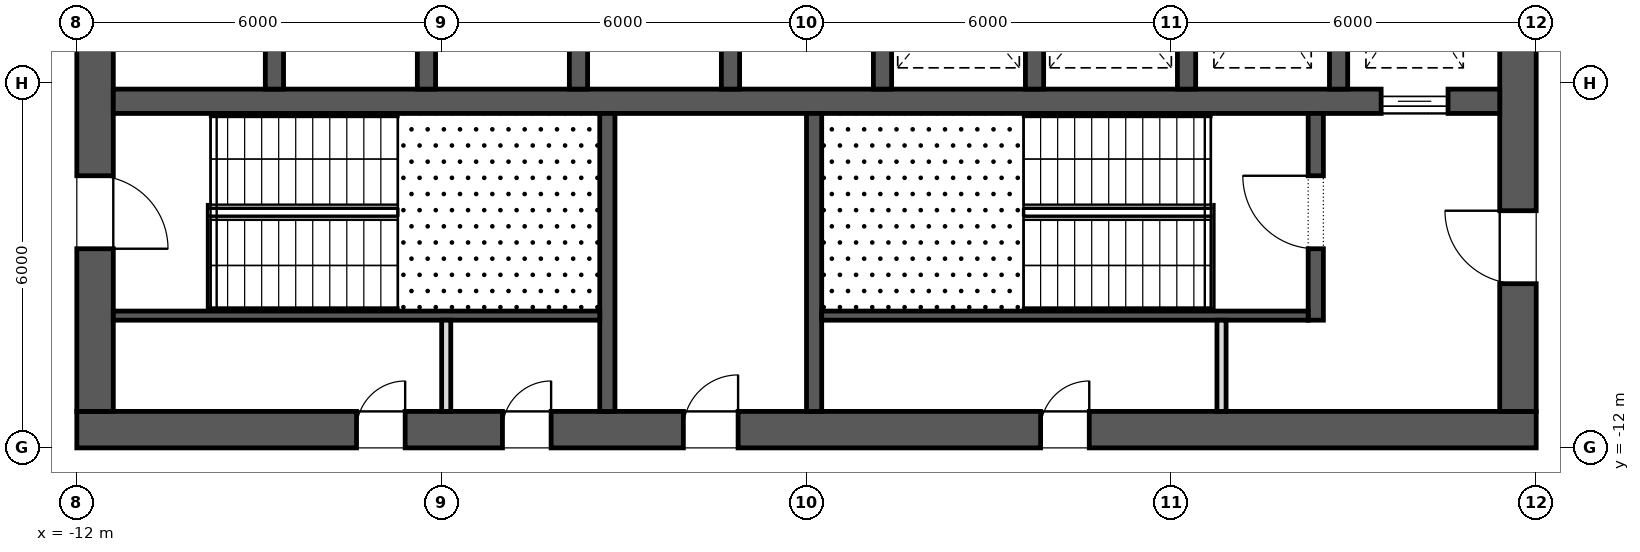
"""IFC4 building model, lengths in metres.
Left out: names, types, materials, properties, quantities, classifications, styles, units other than length and angle.
Written with IfcOpenShell. Run it as: python <this file> out.ifc"""

import sys

from ifc_helpers import new_model, si_unit, direction, frame, frame_2d, origin, place, context, subcontext, project, spatial, rectangle, extrude, element, fill, save


model = new_model("IFC4")
c1 = context("Model", 3, precision=1e-05, world=origin(), true_north=direction((0.0, 1.0)))
c2 = subcontext(c1, "Body", "Model", "MODEL_VIEW")
j1 = project(units=[si_unit("LENGTHUNIT", "METRE"), si_unit("PLANEANGLEUNIT", "RADIAN")], contexts=[c1])
p1 = place(None, origin())
s1 = spatial("IfcSite", under=j1, at=p1, CompositionType="ELEMENT")
p2 = place(p1, origin())
s2 = spatial("IfcBuilding", under=s1, at=p2, CompositionType="ELEMENT")
p3 = place(p2, frame((0.0, 0.0, 27.7)))
s3 = spatial("IfcBuildingStorey", under=s2, at=p3, CompositionType="ELEMENT", Elevation=27.7)
p4 = place(p3, frame((-12.0, -11.7, 0.0), z_axis=(0.0, 0.0, 1.0), x_axis=(1.0, 0.0, 0.0)))
e1 = element("IfcWall", 1, at=p4, inside=s3, PredefinedType="SHEAR", context=c2, shape_type="SweptSolid", body=[
    extrude(rectangle(XDim=24.0, YDim=0.6, at=frame_2d((12.0, 0.0))), origin(), (0.0, 0.0, 1.0), 4.2),
])
p5 = place(p4, frame((9.975, 0.0, 0.0)))
e2 = element("IfcOpeningElement", 2, at=p5, cuts=e1, PredefinedType="OPENING", context=c2, shape_type="SweptSolid", body=[
    extrude(rectangle(XDim=0.9, YDim=2.1, at=frame_2d((0.45, 1.05))), frame((0.0, 0.312, 0.0), z_axis=(0.0, -1.0, 0.0), x_axis=(1.0, 0.0, 0.0)), (0.0, 0.0, 1.0), 0.624),
])
p6 = place(p4, frame((4.6, 0.0, 0.0)))
e3 = element("IfcOpeningElement", 3, at=p6, cuts=e1, PredefinedType="OPENING", context=c2, shape_type="SweptSolid", body=[
    extrude(rectangle(XDim=0.8, YDim=2.1, at=frame_2d((0.4, 1.05))), frame((0.0, 0.312, 0.0), z_axis=(0.0, -1.0, 0.0), x_axis=(1.0, 0.0, 0.0)), (0.0, 0.0, 1.0), 0.624),
])
p7 = place(p4, frame((7.0, 0.0, 0.0)))
e4 = element("IfcOpeningElement", 4, at=p7, cuts=e1, PredefinedType="OPENING", context=c2, shape_type="SweptSolid", body=[
    extrude(rectangle(XDim=0.8, YDim=2.1, at=frame_2d((0.4, 1.05))), frame((0.0, 0.312, 0.0), z_axis=(0.0, -1.0, 0.0), x_axis=(1.0, 0.0, 0.0)), (0.0, 0.0, 1.0), 0.624),
])
p8 = place(p4, frame((15.85, 0.0, 0.0)))
e5 = element("IfcOpeningElement", 5, at=p8, cuts=e1, PredefinedType="OPENING", context=c2, shape_type="SweptSolid", body=[
    extrude(rectangle(XDim=0.8, YDim=2.1, at=frame_2d((0.4, 1.05))), frame((0.0, 0.312, 0.0), z_axis=(0.0, -1.0, 0.0), x_axis=(1.0, 0.0, 0.0)), (0.0, 0.0, 1.0), 0.624),
])
p9 = place(p3, frame((11.7, -11.4, 0.0), z_axis=(0.0, 0.0, 1.0), x_axis=(0.0, 1.0, 0.0)))
e6 = element("IfcWall", 6, at=p9, inside=s3, PredefinedType="SHEAR", context=c2, shape_type="SweptSolid", body=[
    extrude(rectangle(XDim=22.8, YDim=0.6, at=frame_2d((11.4, 0.0))), origin(), (0.0, 0.0, 1.0), 4.2),
])
p10 = place(p9, frame((10.2, 0.0, 0.0)))
e7 = element("IfcOpeningElement", 7, at=p10, cuts=e6, PredefinedType="OPENING", context=c2, shape_type="SweptSolid", body=[
    extrude(rectangle(XDim=2.4, YDim=2.1, at=frame_2d((1.2, 1.05))), frame((0.0, 0.312, 0.0), z_axis=(0.0, -1.0, 0.0), x_axis=(1.0, 0.0, 0.0)), (0.0, 0.0, 1.0), 0.624),
])
p11 = place(p9, frame((19.5, 0.0, 0.0)))
e8 = element("IfcOpeningElement", 8, at=p11, cuts=e6, PredefinedType="OPENING", context=c2, shape_type="SweptSolid", body=[
    extrude(rectangle(XDim=1.2, YDim=2.1, at=frame_2d((0.6, 1.05))), frame((0.0, 0.312, 0.0), z_axis=(0.0, -1.0, 0.0), x_axis=(1.0, 0.0, 0.0)), (0.0, 0.0, 1.0), 0.624),
])
p12 = place(p9, frame((2.1, 0.0, 0.0)))
e9 = element("IfcOpeningElement", 9, at=p12, cuts=e6, PredefinedType="OPENING", context=c2, shape_type="SweptSolid", body=[
    extrude(rectangle(XDim=1.2, YDim=2.1, at=frame_2d((0.6, 1.05))), frame((0.0, 0.312, 0.0), z_axis=(0.0, -1.0, 0.0), x_axis=(1.0, 0.0, 0.0)), (0.0, 0.0, 1.0), 0.624),
])
p13 = place(p3, frame((-11.7, -11.4, 0.0), z_axis=(0.0, 0.0, 1.0), x_axis=(0.0, 1.0, 0.0)))
e10 = element("IfcWall", 10, at=p13, inside=s3, PredefinedType="SHEAR", context=c2, shape_type="SweptSolid", body=[
    extrude(rectangle(XDim=22.8, YDim=0.6, at=frame_2d((11.4, 0.0))), origin(), (0.0, 0.0, 1.0), 4.2),
])
p14 = place(p13, frame((10.2, 0.0, 0.0)))
e11 = element("IfcOpeningElement", 11, at=p14, cuts=e10, PredefinedType="OPENING", context=c2, shape_type="SweptSolid", body=[
    extrude(rectangle(XDim=2.4, YDim=2.1, at=frame_2d((1.2, 1.05))), frame((0.0, 0.312, 0.0), z_axis=(0.0, -1.0, 0.0), x_axis=(1.0, 0.0, 0.0)), (0.0, 0.0, 1.0), 0.624),
])
p15 = place(p13, frame((18.925, 0.0, 0.0)))
e12 = element("IfcOpeningElement", 12, at=p15, cuts=e10, PredefinedType="OPENING", context=c2, shape_type="SweptSolid", body=[
    extrude(rectangle(XDim=1.2, YDim=2.1, at=frame_2d((0.6, 1.05))), frame((0.0, 0.312, 0.0), z_axis=(0.0, -1.0, 0.0), x_axis=(1.0, 0.0, 0.0)), (0.0, 0.0, 1.0), 0.624),
])
p16 = place(p13, frame((2.675, 0.0, 0.0)))
e13 = element("IfcOpeningElement", 13, at=p16, cuts=e10, PredefinedType="OPENING", context=c2, shape_type="SweptSolid", body=[
    extrude(rectangle(XDim=1.2, YDim=2.1, at=frame_2d((0.6, 1.05))), frame((0.0, 0.312, 0.0), z_axis=(0.0, -1.0, 0.0), x_axis=(1.0, 0.0, 0.0)), (0.0, 0.0, 1.0), 0.624),
])
p17 = place(p3, frame((-11.4, -6.3, 0.0), z_axis=(0.0, 0.0, 1.0), x_axis=(1.0, 0.0, 0.0)))
e14 = element("IfcWall", 14, at=p17, inside=s3, PredefinedType="SHEAR", context=c2, shape_type="SweptSolid", body=[
    extrude(rectangle(XDim=22.8, YDim=0.4, at=frame_2d((11.4, 0.0))), origin(), (0.0, 0.0, 1.0), 4.2),
])
p18 = place(p17, frame((20.85, 0.0, 0.0)))
e15 = element("IfcOpeningElement", 15, at=p18, cuts=e14, PredefinedType="OPENING", context=c2, shape_type="SweptSolid", body=[
    extrude(rectangle(XDim=1.1, YDim=2.1, at=frame_2d((0.55, 1.05))), frame((0.0, 0.212, 0.0), z_axis=(0.0, -1.0, 0.0), x_axis=(1.0, 0.0, 0.0)), (0.0, 0.0, 1.0), 0.424),
])
for number, where, z_axis, x_axis in (
    (16, (-8.75, -6.1, 0.0), (0.0, 0.0, 1.0), (0.0, 1.0, 0.0)),
    (17, (-6.25, -6.1, 0.0), (0.0, 0.0, 1.0), (0.0, 1.0, 0.0)),
    (18, (-3.75, -6.1, 0.0), (0.0, 0.0, 1.0), (0.0, 1.0, 0.0)),
    (19, (-1.25, -6.1, 0.0), (0.0, 0.0, 1.0), (0.0, 1.0, 0.0)),
    (20, (1.25, -6.1, 0.0), (0.0, 0.0, 1.0), (0.0, 1.0, 0.0)),
    (21, (3.75, -6.1, 0.0), (0.0, 0.0, 1.0), (0.0, 1.0, 0.0)),
    (22, (6.25, -6.1, 0.0), (0.0, 0.0, 1.0), (0.0, 1.0, 0.0)),
    (23, (8.75, -6.1, 0.0), (0.0, 0.0, 1.0), (0.0, 1.0, 0.0)),
):
    element("IfcWall", number, at=place(p3, frame(where, z_axis=z_axis, x_axis=x_axis)), inside=s3, PredefinedType="SHEAR", context=c2, shape_type="SweptSolid", body=[
        extrude(rectangle(XDim=2.9, YDim=0.3, at=frame_2d((1.45, 0.0))), origin(), (0.0, 0.0, 1.0), 4.2),
    ])
for number, where, z_axis, x_axis in (
    (24, (-3.275, -11.4, 0.0), (0.0, 0.0, 1.0), (0.0, 1.0, 0.0)),
    (25, (0.125, -11.4, 0.0), (0.0, 0.0, 1.0), (0.0, 1.0, 0.0)),
):
    element("IfcWall", number, at=place(p3, frame(where, z_axis=z_axis, x_axis=x_axis)), inside=s3, PredefinedType="SHEAR", context=c2, shape_type="SweptSolid", body=[
        extrude(rectangle(XDim=4.9, YDim=0.25, at=frame_2d((2.45, 0.0))), origin(), (0.0, 0.0, 1.0), 3.9),
    ])
p19 = place(p3, frame((8.375, -9.9, 0.0), z_axis=(0.0, 0.0, 1.0), x_axis=(0.0, 1.0, 0.0)))
e26 = element("IfcWall", 26, at=p19, inside=s3, PredefinedType="SHEAR", context=c2, shape_type="SweptSolid", body=[
    extrude(rectangle(XDim=3.4, YDim=0.25, at=frame_2d((1.7, 0.0))), origin(), (0.0, 0.0, 1.0), 3.9),
])
p20 = place(p19, frame((1.175, 0.0, 0.0)))
e27 = element("IfcOpeningElement", 27, at=p20, cuts=e26, PredefinedType="OPENING", context=c2, shape_type="SweptSolid", body=[
    extrude(rectangle(XDim=1.2, YDim=2.1, at=frame_2d((0.6, 1.05))), frame((0.0, 0.137, 0.0), z_axis=(0.0, -1.0, 0.0), x_axis=(1.0, 0.0, 0.0)), (0.0, 0.0, 1.0), 0.274),
])
for number, where, z_axis, x_axis in (
    (28, (-11.4, -9.825, 0.0), (0.0, 0.0, 1.0), (1.0, 0.0, 0.0)),
    (29, (0.25, -9.825, 0.0), (0.0, 0.0, 1.0), (1.0, 0.0, 0.0)),
):
    element("IfcWall", number, at=place(p3, frame(where, z_axis=z_axis, x_axis=x_axis)), inside=s3, PredefinedType="SHEAR", context=c2, shape_type="SweptSolid", body=[
        extrude(rectangle(XDim=8.0, YDim=0.15, at=frame_2d((4.0, 0.0))), origin(), (0.0, 0.0, 1.0), 3.9),
    ])
for number, where, z_axis, x_axis in (
    (30, (-5.925, -11.4, 0.0), (0.0, 0.0, 1.0), (0.0, 1.0, 0.0)),
    (31, (6.825, -11.4, 0.0), (0.0, 0.0, 1.0), (0.0, 1.0, 0.0)),
):
    element("IfcWall", number, at=place(p3, frame(where, z_axis=z_axis, x_axis=x_axis)), inside=s3, PredefinedType="PARTITIONING", context=c2, shape_type="SweptSolid", body=[
        extrude(rectangle(XDim=1.5, YDim=0.15, at=frame_2d((0.75, 0.0))), origin(), (0.0, 0.0, 1.0), 3.9),
    ])
p21 = place(p18, origin())
e32 = element("IfcDoor", 32, at=p21, inside=s3, OperationType="SLIDING_TO_LEFT", PredefinedType="DOOR", context=c2, shape_type="SweptSolid", body=[
    extrude(rectangle(XDim=1.1, YDim=2.1, at=frame_2d((0.55, 1.05))), frame((0.0, 0.025, 0.0), z_axis=(0.0, -1.0, 0.0), x_axis=(1.0, 0.0, 0.0)), (0.0, 0.0, 1.0), 0.05),
])
fill(e15, e32)
p22 = place(p16, frame((1.2, 0.0, 0.0), z_axis=(0.0, 0.0, 1.0), x_axis=(-1.0, 0.0, 0.0)))
e33 = element("IfcDoor", 33, at=p22, inside=s3, OperationType="SINGLE_SWING_LEFT", PredefinedType="DOOR", context=c2, shape_type="SweptSolid", body=[
    extrude(rectangle(XDim=1.2, YDim=2.1, at=frame_2d((0.6, 1.05))), frame((0.0, 0.025, 0.0), z_axis=(0.0, -1.0, 0.0), x_axis=(1.0, 0.0, 0.0)), (0.0, 0.0, 1.0), 0.05),
])
fill(e13, e33)
p23 = place(p20, origin())
e34 = element("IfcDoor", 34, at=p23, inside=s3, OperationType="SINGLE_SWING_LEFT", PredefinedType="DOOR", context=c2, shape_type="SweptSolid", body=[
    extrude(rectangle(XDim=1.2, YDim=2.1, at=frame_2d((0.6, 1.05))), frame((0.0, 0.025, 0.0), z_axis=(0.0, -1.0, 0.0), x_axis=(1.0, 0.0, 0.0)), (0.0, 0.0, 1.0), 0.05),
])
fill(e27, e34)
p24 = place(p12, origin())
e35 = element("IfcDoor", 35, at=p24, inside=s3, OperationType="SINGLE_SWING_LEFT", PredefinedType="DOOR", context=c2, shape_type="SweptSolid", body=[
    extrude(rectangle(XDim=1.2, YDim=2.1, at=frame_2d((0.6, 1.05))), frame((0.0, 0.025, 0.0), z_axis=(0.0, -1.0, 0.0), x_axis=(1.0, 0.0, 0.0)), (0.0, 0.0, 1.0), 0.05),
])
fill(e9, e35)
p25 = place(p5, origin())
e36 = element("IfcDoor", 36, at=p25, inside=s3, OperationType="SINGLE_SWING_LEFT", PredefinedType="DOOR", context=c2, shape_type="SweptSolid", body=[
    extrude(rectangle(XDim=0.9, YDim=2.1, at=frame_2d((0.45, 1.05))), frame((0.0, 0.025, 0.0), z_axis=(0.0, -1.0, 0.0), x_axis=(1.0, 0.0, 0.0)), (0.0, 0.0, 1.0), 0.05),
])
fill(e2, e36)
p26 = place(p6, origin())
e37 = element("IfcDoor", 37, at=p26, inside=s3, OperationType="SINGLE_SWING_LEFT", PredefinedType="DOOR", context=c2, shape_type="SweptSolid", body=[
    extrude(rectangle(XDim=0.8, YDim=2.1, at=frame_2d((0.4, 1.05))), frame((0.0, 0.025, 0.0), z_axis=(0.0, -1.0, 0.0), x_axis=(1.0, 0.0, 0.0)), (0.0, 0.0, 1.0), 0.05),
])
fill(e3, e37)
p27 = place(p7, origin())
e38 = element("IfcDoor", 38, at=p27, inside=s3, OperationType="SINGLE_SWING_LEFT", PredefinedType="DOOR", context=c2, shape_type="SweptSolid", body=[
    extrude(rectangle(XDim=0.8, YDim=2.1, at=frame_2d((0.4, 1.05))), frame((0.0, 0.025, 0.0), z_axis=(0.0, -1.0, 0.0), x_axis=(1.0, 0.0, 0.0)), (0.0, 0.0, 1.0), 0.05),
])
fill(e4, e38)
p28 = place(p8, origin())
e39 = element("IfcDoor", 39, at=p28, inside=s3, OperationType="SINGLE_SWING_LEFT", PredefinedType="DOOR", context=c2, shape_type="SweptSolid", body=[
    extrude(rectangle(XDim=0.8, YDim=2.1, at=frame_2d((0.4, 1.05))), frame((0.0, 0.025, 0.0), z_axis=(0.0, -1.0, 0.0), x_axis=(1.0, 0.0, 0.0)), (0.0, 0.0, 1.0), 0.05),
])
fill(e5, e39)
save(model, sys.argv[1])
